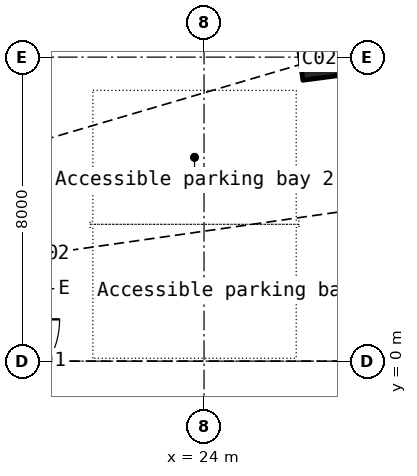
"""IFC4 building model, lengths in metres.
Left out: names, types, materials, properties, quantities, classifications, styles, units other than length and angle.
Written with IfcOpenShell. Run it as: python <this file> out.ifc"""

import sys

from ifc_helpers import new_model, si_unit, direction, frame, origin, origin_2d, place, context, subcontext, project, spatial, hollow_rectangle, extrude, element, save


model = new_model("IFC4")
c1 = context("Model", 3, precision=1e-05, world=origin(), true_north=direction((0.0, 1.0)))
c2 = subcontext(c1, "Body", "Model", "MODEL_VIEW")
j1 = project(units=[si_unit("LENGTHUNIT", "METRE"), si_unit("PLANEANGLEUNIT", "RADIAN")], contexts=[c1])
p1 = place(None, origin())
s1 = spatial("IfcSite", under=j1, at=p1, CompositionType="ELEMENT")
p2 = place(p1, origin())
s2 = spatial("IfcBuilding", under=s1, at=p2, CompositionType="ELEMENT")
p3 = place(p2, origin())
s3 = spatial("IfcBuildingStorey", under=s2, at=p3, CompositionType="ELEMENT", Elevation=0.0)
p4 = place(p3, frame((28.442, 0.0, 0.0), z_axis=(-0.03461234, 0.0, 0.999400813), x_axis=(0.0, -1.0, 0.0)))
e1 = element("IfcColumn", 1, at=p4, inside=s3, PredefinedType="COLUMN", context=c2, shape_type="SweptSolid", body=[
    extrude(hollow_rectangle(XDim=1.6, YDim=1.6, WallThickness=0.04, at=origin_2d()), origin(), (0.0, 0.0, 1.0), 7.004),
])
p5 = place(p3, frame((28.311, 4.034, 0.0), z_axis=(-0.034054879, -0.004914778, 0.99940788), x_axis=(0.212173701, -0.977228962, 0.002424122)))
e2 = element("IfcColumn", 2, at=p5, inside=s3, PredefinedType="COLUMN", context=c2, shape_type="SweptSolid", body=[
    extrude(hollow_rectangle(XDim=1.0, YDim=1.0, WallThickness=0.032, at=origin_2d()), origin(), (0.0, 0.0, 1.0), 7.004),
])
p6 = place(p3, frame((27.03, 7.951, 0.0), z_axis=(-0.032486896, -0.009690297, 0.999425185), x_axis=(0.409435953, -0.912327946, 0.00446314)))
e3 = element("IfcColumn", 3, at=p6, inside=s3, PredefinedType="COLUMN", context=c2, shape_type="SweptSolid", body=[
    extrude(hollow_rectangle(XDim=1.0, YDim=1.0, WallThickness=0.032, at=origin_2d()), origin(), (0.0, 0.0, 1.0), 7.004),
])
save(model, sys.argv[1])
